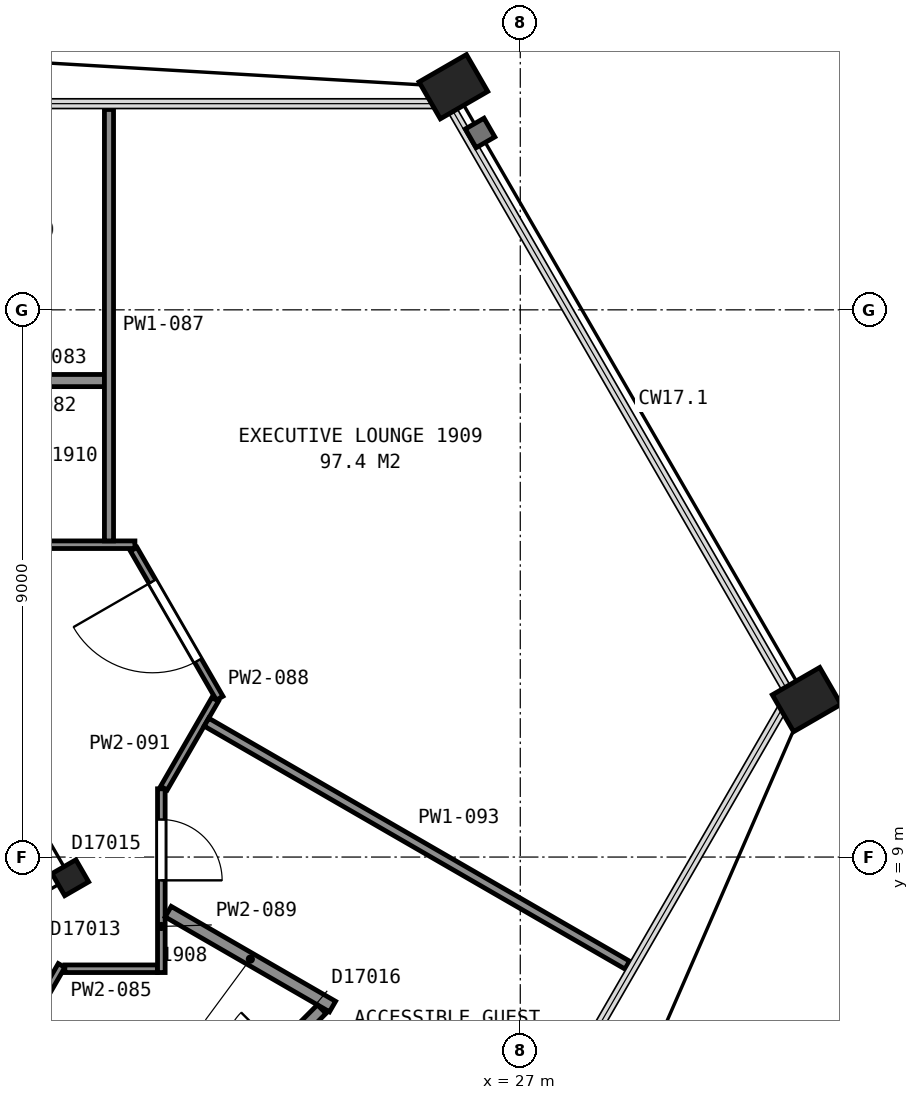
"""IFC4 building model, lengths in metres.
Left out: names, types, materials, properties, quantities, classifications, styles, units other than length and angle.
Written with IfcOpenShell. Run it as: python <this file> out.ifc"""

import sys

from ifc_helpers import new_model, si_unit, direction, frame, frame_2d, origin, origin_2d, place, context, subcontext, project, spatial, rectangle, hollow_rectangle, i_section, extrude, element, fill, save


model = new_model("IFC4")
c1 = context("Model", 3, precision=1e-05, world=origin(), true_north=direction((0.0, 1.0)))
c2 = subcontext(c1, "Body", "Model", "MODEL_VIEW")
j1 = project(units=[si_unit("LENGTHUNIT", "METRE"), si_unit("PLANEANGLEUNIT", "RADIAN")], contexts=[c1])
p1 = place(None, origin())
s1 = spatial("IfcSite", under=j1, at=p1, CompositionType="ELEMENT")
p2 = place(p1, origin())
s2 = spatial("IfcBuilding", under=s1, at=p2, CompositionType="ELEMENT")
p3 = place(p2, frame((0.0, 0.0, 83.6)))
s3 = spatial("IfcBuildingStorey", under=s2, at=p3, CompositionType="ELEMENT", Elevation=83.6)
for number, where, z_axis, x_axis in (
    (1, (25.9, 21.67, 0.0), (0.0, 0.0, 1.0), (0.5, -0.866, 0.0)),
    (2, (31.71, 11.59, 0.0), (0.0, 0.0, 1.0), (0.5, -0.866, 0.0)),
):
    element("IfcColumn", number, at=place(p3, frame(where, z_axis=z_axis, x_axis=x_axis)), inside=s3, PredefinedType="COLUMN", context=c2, shape_type="SweptSolid", body=[
        extrude(hollow_rectangle(XDim=0.7, YDim=0.9, WallThickness=0.065, at=origin_2d()), origin(), (0.0, 0.0, 1.0), 3.6),
    ])
p4 = place(p3, frame((19.6, 8.66, 0.0), z_axis=(0.0, 0.0, 1.0), x_axis=(0.5, -0.866025403784, 0.0)))
e3 = element("IfcColumn", 3, at=p4, inside=s3, PredefinedType="COLUMN", context=c2, shape_type="SweptSolid", body=[
    extrude(i_section(OverallWidth=0.419, OverallDepth=0.455, WebThickness=0.042, FlangeThickness=0.068, FilletRadius=0.015, at=origin_2d()), origin(), (0.0, 0.0, 1.0), 3.6),
])
p5 = place(p3, frame((-20.663, 14.137, 0.0), z_axis=(0.0, 0.0, 1.0), x_axis=(1.0, 0.0, 0.0)))
e4 = element("IfcWall", 4, at=p5, inside=s3, PredefinedType="PARTITIONING", context=c2, shape_type="SweptSolid", body=[
    extrude(rectangle(XDim=41.325, YDim=0.125, at=frame_2d((20.663, 0.0))), origin(), (0.0, 0.0, 1.0), 2.262),
])
p6 = place(p5, frame((37.071, 0.0, 0.0)))
e5 = element("IfcOpeningElement", 5, at=p6, cuts=e4, PredefinedType="OPENING", context=c2, shape_type="SweptSolid", body=[
    extrude(rectangle(XDim=0.9, YDim=2.1, at=frame_2d((0.45, 1.05))), frame((0.0, 0.073, 0.0), z_axis=(0.0, -1.0, 0.0), x_axis=(1.0, 0.0, 0.0)), (0.0, 0.0, 1.0), 0.145),
])
p7 = place(p5, frame((34.272, 0.0, 0.0)))
e6 = element("IfcOpeningElement", 6, at=p7, cuts=e4, PredefinedType="OPENING", context=c2, shape_type="SweptSolid", body=[
    extrude(rectangle(XDim=1.0, YDim=2.1, at=frame_2d((0.5, 1.05))), frame((0.0, 0.073, 0.0), z_axis=(0.0, -1.0, 0.0), x_axis=(1.0, 0.0, 0.0)), (0.0, 0.0, 1.0), 0.145),
])
p8 = place(p5, frame((26.496, 0.0, 0.0)))
e7 = element("IfcOpeningElement", 7, at=p8, cuts=e4, PredefinedType="OPENING", context=c2, shape_type="SweptSolid", body=[
    extrude(rectangle(XDim=0.9, YDim=2.1, at=frame_2d((0.45, 1.05))), frame((0.0, 0.073, 0.0), z_axis=(0.0, -1.0, 0.0), x_axis=(1.0, 0.0, 0.0)), (0.0, 0.0, 1.0), 0.145),
])
p9 = place(p5, frame((23.917, 0.0, 0.0)))
e8 = element("IfcOpeningElement", 8, at=p9, cuts=e4, PredefinedType="OPENING", context=c2, shape_type="SweptSolid", body=[
    extrude(rectangle(XDim=0.9, YDim=2.1, at=frame_2d((0.45, 1.05))), frame((0.0, 0.073, 0.0), z_axis=(0.0, -1.0, 0.0), x_axis=(1.0, 0.0, 0.0)), (0.0, 0.0, 1.0), 0.145),
])
p10 = place(p5, frame((16.78, 0.0, 0.0)))
e9 = element("IfcOpeningElement", 9, at=p10, cuts=e4, PredefinedType="OPENING", context=c2, shape_type="SweptSolid", body=[
    extrude(rectangle(XDim=0.9, YDim=2.1, at=frame_2d((0.45, 1.05))), frame((0.0, 0.073, 0.0), z_axis=(0.0, -1.0, 0.0), x_axis=(1.0, 0.0, 0.0)), (0.0, 0.0, 1.0), 0.145),
])
p11 = place(p5, frame((13.952, 0.0, 0.0)))
e10 = element("IfcOpeningElement", 10, at=p11, cuts=e4, PredefinedType="OPENING", context=c2, shape_type="SweptSolid", body=[
    extrude(rectangle(XDim=0.9, YDim=2.1, at=frame_2d((0.45, 1.05))), frame((0.0, 0.073, 0.0), z_axis=(0.0, -1.0, 0.0), x_axis=(1.0, 0.0, 0.0)), (0.0, 0.0, 1.0), 0.145),
])
p12 = place(p5, frame((7.175, 0.0, 0.0)))
e11 = element("IfcOpeningElement", 11, at=p12, cuts=e4, PredefinedType="OPENING", context=c2, shape_type="SweptSolid", body=[
    extrude(rectangle(XDim=0.9, YDim=2.1, at=frame_2d((0.45, 1.05))), frame((0.0, 0.073, 0.0), z_axis=(0.0, -1.0, 0.0), x_axis=(1.0, 0.0, 0.0)), (0.0, 0.0, 1.0), 0.145),
])
p13 = place(p5, frame((4.376, 0.0, 0.0)))
e12 = element("IfcOpeningElement", 12, at=p13, cuts=e4, PredefinedType="OPENING", context=c2, shape_type="SweptSolid", body=[
    extrude(rectangle(XDim=1.0, YDim=2.1, at=frame_2d((0.5, 1.05))), frame((0.0, 0.073, 0.0), z_axis=(0.0, -1.0, 0.0), x_axis=(1.0, 0.0, 0.0)), (0.0, 0.0, 1.0), 0.145),
])
p14 = place(p3, frame((19.456, 7.217, 0.0), z_axis=(0.0, 0.0, 1.0), x_axis=(-0.50002170027, -0.866012874765, 0.0)))
e13 = element("IfcWall", 13, at=p14, inside=s3, PredefinedType="PARTITIONING", context=c2, shape_type="SweptSolid", body=[
    extrude(rectangle(XDim=31.379, YDim=0.125, at=frame_2d((15.69, 0.0))), origin(), (0.0, 0.0, 1.0), 2.262),
])
p15 = place(p14, frame((26.843, 0.0, 0.0)))
e14 = element("IfcOpeningElement", 14, at=p15, cuts=e13, PredefinedType="OPENING", context=c2, shape_type="SweptSolid", body=[
    extrude(rectangle(XDim=1.0, YDim=2.1, at=frame_2d((0.5, 1.05))), frame((0.0, 0.073, 0.0), z_axis=(0.0, -1.0, 0.0), x_axis=(1.0, 0.0, 0.0)), (0.0, 0.0, 1.0), 0.145),
])
p16 = place(p14, frame((24.03, 0.0, 0.0)))
e15 = element("IfcOpeningElement", 15, at=p16, cuts=e13, PredefinedType="OPENING", context=c2, shape_type="SweptSolid", body=[
    extrude(rectangle(XDim=0.9, YDim=2.1, at=frame_2d((0.45, 1.05))), frame((0.0, 0.073, 0.0), z_axis=(0.0, -1.0, 0.0), x_axis=(1.0, 0.0, 0.0)), (0.0, 0.0, 1.0), 0.145),
])
p17 = place(p14, frame((17.159, 0.0, 0.0)))
e16 = element("IfcOpeningElement", 16, at=p17, cuts=e13, PredefinedType="OPENING", context=c2, shape_type="SweptSolid", body=[
    extrude(rectangle(XDim=0.9, YDim=2.1, at=frame_2d((0.45, 1.05))), frame((0.0, 0.073, 0.0), z_axis=(0.0, -1.0, 0.0), x_axis=(1.0, 0.0, 0.0)), (0.0, 0.0, 1.0), 0.145),
])
p18 = place(p14, frame((14.24, 0.0, 0.0)))
e17 = element("IfcOpeningElement", 17, at=p18, cuts=e13, PredefinedType="OPENING", context=c2, shape_type="SweptSolid", body=[
    extrude(rectangle(XDim=0.9, YDim=2.1, at=frame_2d((0.45, 1.05))), frame((0.0, 0.073, 0.0), z_axis=(0.0, -1.0, 0.0), x_axis=(1.0, 0.0, 0.0)), (0.0, 0.0, 1.0), 0.145),
])
p19 = place(p14, frame((6.997, 0.0, 0.0)))
e18 = element("IfcOpeningElement", 18, at=p19, cuts=e13, PredefinedType="OPENING", context=c2, shape_type="SweptSolid", body=[
    extrude(rectangle(XDim=0.9, YDim=2.1, at=frame_2d((0.45, 1.05))), frame((0.0, 0.073, 0.0), z_axis=(0.0, -1.0, 0.0), x_axis=(1.0, 0.0, 0.0)), (0.0, 0.0, 1.0), 0.145),
])
p20 = place(p14, frame((4.327, 0.0, 0.0)))
e19 = element("IfcOpeningElement", 19, at=p20, cuts=e13, PredefinedType="OPENING", context=c2, shape_type="SweptSolid", body=[
    extrude(rectangle(XDim=0.9, YDim=2.1, at=frame_2d((0.45, 1.05))), frame((0.0, 0.073, 0.0), z_axis=(0.0, -1.0, 0.0), x_axis=(1.0, 0.0, 0.0)), (0.0, 0.0, 1.0), 0.145),
])
p21 = place(p3, frame((18.236, 16.837, 0.0), z_axis=(0.0, 0.0, 1.0), x_axis=(1.0, 0.0, 0.0)))
e20 = element("IfcWall", 20, at=p21, inside=s3, PredefinedType="PARTITIONING", context=c2, shape_type="SweptSolid", body=[
    extrude(rectangle(XDim=1.925, YDim=0.2, at=frame_2d((0.962, 0.0))), origin(), (0.0, 0.0, 1.0), 2.262),
])
p22 = place(p3, frame((19.51, 7.163, 0.0), z_axis=(0.0, 0.0, 1.0), x_axis=(1.0, 0.0, 0.0)))
e21 = element("IfcWall", 21, at=p22, inside=s3, PredefinedType="PARTITIONING", context=c2, shape_type="SweptSolid", body=[
    extrude(rectangle(XDim=1.522, YDim=0.125, at=frame_2d((0.761, 0.0))), origin(), (0.0, 0.0, 1.0), 2.262),
])
p23 = place(p3, frame((20.236, 14.199, 0.0), z_axis=(0.0, 0.0, 1.0), x_axis=(0.0, 1.0, 0.0)))
e22 = element("IfcWall", 22, at=p23, inside=s3, PredefinedType="PARTITIONING", context=c2, shape_type="SweptSolid", body=[
    extrude(rectangle(XDim=7.095, YDim=0.15, at=frame_2d((3.548, 0.0))), origin(), (0.0, 0.0, 1.0), 2.262),
])
p24 = place(p3, frame((20.643, 14.063, 0.0), z_axis=(0.0, 0.0, 1.0), x_axis=(0.499647745683, -0.866228682412, 0.0)))
e23 = element("IfcWall", 23, at=p24, inside=s3, PredefinedType="PARTITIONING", context=c2, shape_type="SweptSolid", body=[
    extrude(rectangle(XDim=2.829, YDim=0.125, at=frame_2d((1.415, 0.0))), origin(), (0.0, 0.0, 1.0), 2.262),
])
p25 = place(p24, frame((0.615, 0.0, 0.0)))
e24 = element("IfcOpeningElement", 24, at=p25, cuts=e23, PredefinedType="OPENING", context=c2, shape_type="SweptSolid", body=[
    extrude(rectangle(XDim=1.5, YDim=2.1, at=frame_2d((0.75, 1.05))), frame((0.0, 0.073, 0.0), z_axis=(0.0, -1.0, 0.0), x_axis=(1.0, 0.0, 0.0)), (0.0, 0.0, 1.0), 0.145),
])
p26 = place(p3, frame((21.097, 10.123, 0.0), z_axis=(0.0, 0.0, 1.0), x_axis=(0.0, -1.0, 0.0)))
e25 = element("IfcWall", 25, at=p26, inside=s3, PredefinedType="PARTITIONING", context=c2, shape_type="SweptSolid", body=[
    extrude(rectangle(XDim=3.022, YDim=0.125, at=frame_2d((1.511, 0.0))), origin(), (0.0, 0.0, 1.0), 2.262),
])
p27 = place(p26, frame((0.506, 0.0, 0.0)))
e26 = element("IfcOpeningElement", 26, at=p27, cuts=e25, PredefinedType="OPENING", context=c2, shape_type="SweptSolid", body=[
    extrude(rectangle(XDim=1.0, YDim=2.1, at=frame_2d((0.5, 1.05))), frame((0.0, 0.073, 0.0), z_axis=(0.0, -1.0, 0.0), x_axis=(1.0, 0.0, 0.0)), (0.0, 0.0, 1.0), 0.145),
])
p28 = place(p3, frame((21.209, 8.102, 0.0), z_axis=(0.0, 0.0, 1.0), x_axis=(0.86597196262, -0.50009255139, 0.0)))
e27 = element("IfcWall", 27, at=p28, inside=s3, PredefinedType="PARTITIONING", context=c2, shape_type="SweptSolid", body=[
    extrude(rectangle(XDim=3.122, YDim=0.2, at=frame_2d((1.561, 0.0))), origin(), (0.0, 0.0, 1.0), 2.262),
])
p29 = place(p3, frame((21.139, 10.134, 0.0), z_axis=(0.0, 0.0, 1.0), x_axis=(0.500048373822, 0.865997473344, 0.0)))
e28 = element("IfcWall", 28, at=p29, inside=s3, PredefinedType="PARTITIONING", context=c2, shape_type="SweptSolid", body=[
    extrude(rectangle(XDim=1.686, YDim=0.125, at=frame_2d((0.843, 0.0))), origin(), (0.0, 0.0, 1.0), 2.262),
])
p30 = place(p3, frame((21.708, 4.466, 0.0), z_axis=(0.0, 0.0, 1.0), x_axis=(0.70578703929, 0.708424064506, 0.0)))
e29 = element("IfcWall", 29, at=p30, inside=s3, PredefinedType="PARTITIONING", context=c2, shape_type="SweptSolid", body=[
    extrude(rectangle(XDim=2.87, YDim=0.2, at=frame_2d((1.435, 0.0))), origin(), (0.0, 0.0, 1.0), 2.262),
])
p31 = place(p30, frame((0.996, 0.0, 0.0)))
e30 = element("IfcOpeningElement", 30, at=p31, cuts=e29, PredefinedType="OPENING", context=c2, shape_type="SweptSolid", body=[
    extrude(rectangle(XDim=0.9, YDim=2.1, at=frame_2d((0.45, 1.05))), frame((0.0, 0.11, 0.0), z_axis=(0.0, -1.0, 0.0), x_axis=(1.0, 0.0, 0.0)), (0.0, 0.0, 1.0), 0.22),
])
p32 = place(p3, frame((21.839, 11.219, 0.0), z_axis=(0.0, 0.0, 1.0), x_axis=(0.866019724796, -0.500009836168, 0.0)))
e31 = element("IfcWall", 31, at=p32, inside=s3, PredefinedType="PARTITIONING", context=c2, shape_type="SweptSolid", body=[
    extrude(rectangle(XDim=7.991, YDim=0.15, at=frame_2d((3.996, 0.0))), origin(), (0.0, 0.0, 1.0), 2.262),
])
p33 = place(p25, origin())
e32 = element("IfcDoor", 32, at=p33, inside=s3, OperationType="DOUBLE_DOOR_SINGLE_SWING", PredefinedType="DOOR", context=c2, shape_type="SweptSolid", body=[
    extrude(rectangle(XDim=1.5, YDim=2.1, at=frame_2d((0.75, 1.05))), frame((0.0, 0.025, 0.0), z_axis=(0.0, -1.0, 0.0), x_axis=(1.0, 0.0, 0.0)), (0.0, 0.0, 1.0), 0.05),
])
fill(e24, e32)
p34 = place(p27, origin())
e33 = element("IfcDoor", 33, at=p34, inside=s3, OperationType="SINGLE_SWING_RIGHT", PredefinedType="DOOR", context=c2, shape_type="SweptSolid", body=[
    extrude(rectangle(XDim=1.0, YDim=2.1, at=frame_2d((0.5, 1.05))), frame((0.0, 0.025, 0.0), z_axis=(0.0, -1.0, 0.0), x_axis=(1.0, 0.0, 0.0)), (0.0, 0.0, 1.0), 0.05),
])
fill(e26, e33)
save(model, sys.argv[1])
